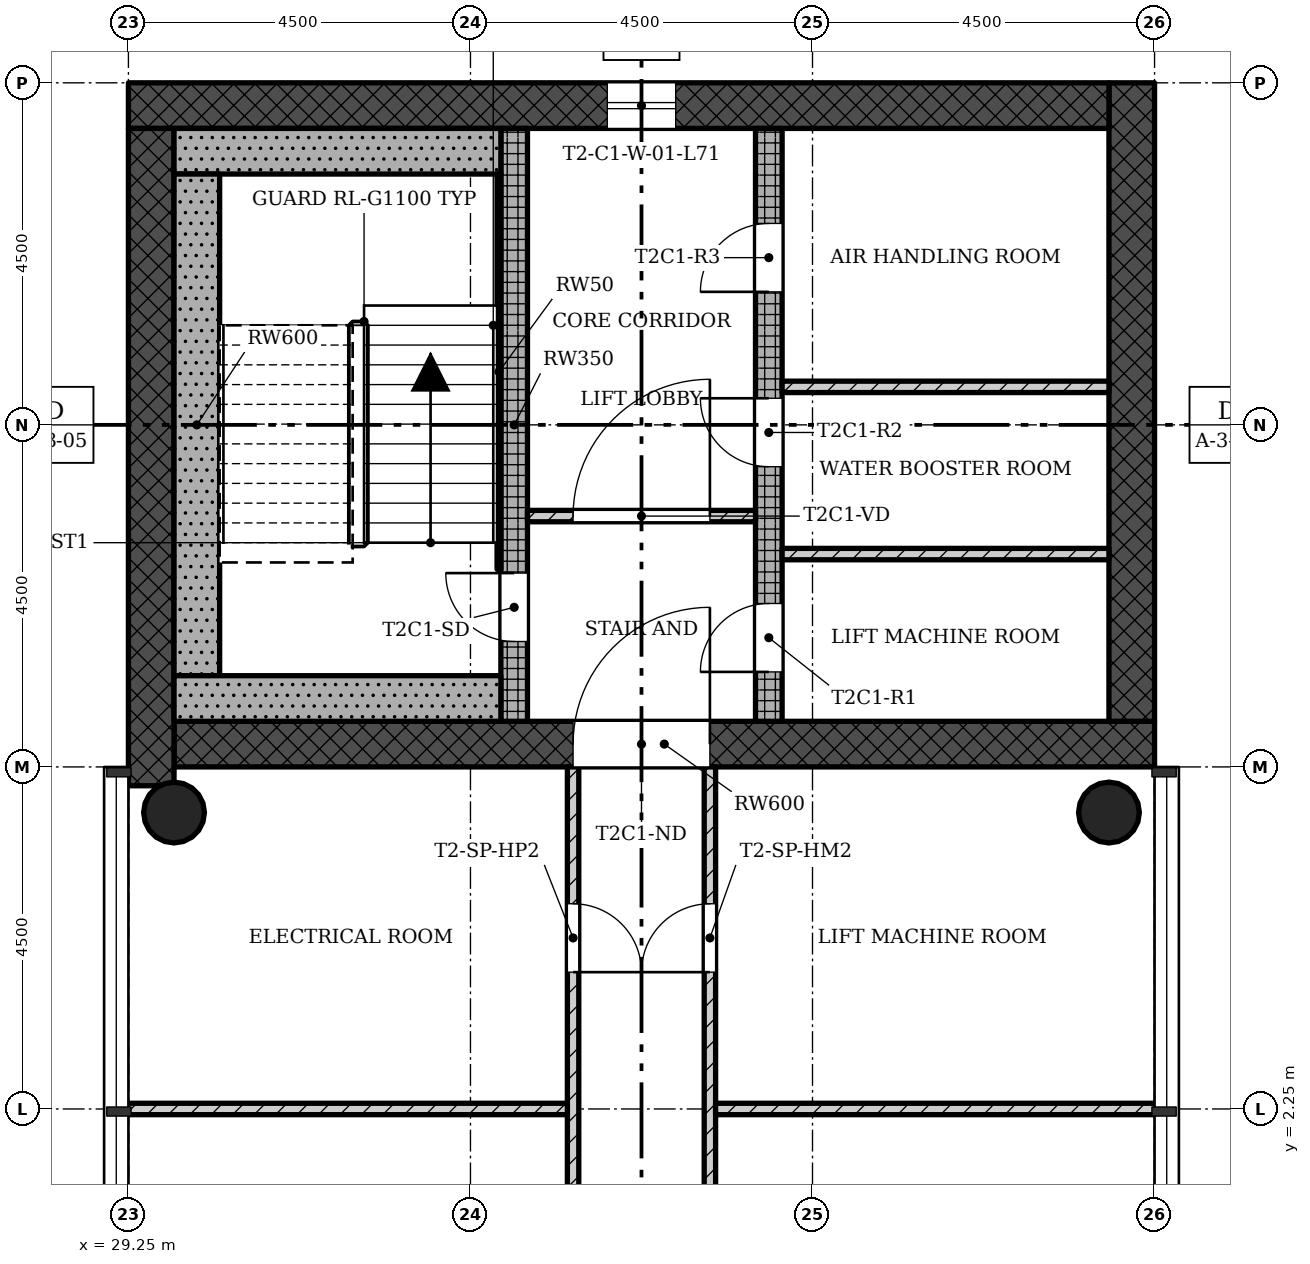
"""IFC4 building model, lengths in metres.
Left out: names, types, materials, properties, quantities, classifications, styles, units other than length and angle.
Written with IfcOpenShell. Run it as: python <this file> out.ifc"""

import sys

from ifc_helpers import new_model, si_unit, direction, frame, frame_2d, origin, origin_2d, place, context, subcontext, project, spatial, rectangle, hollow_circle, extrude, element, fill, save


model = new_model("IFC4")
c1 = context("Model", 3, precision=1e-05, world=origin(), true_north=direction((0.0, 1.0)))
c2 = subcontext(c1, "Body", "Model", "MODEL_VIEW")
j1 = project(units=[si_unit("LENGTHUNIT", "METRE"), si_unit("PLANEANGLEUNIT", "RADIAN")], contexts=[c1])
p1 = place(None, origin())
s1 = spatial("IfcSite", under=j1, at=p1, CompositionType="ELEMENT")
p2 = place(p1, origin())
s2 = spatial("IfcBuilding", under=s1, at=p2, CompositionType="ELEMENT")
p3 = place(p2, frame((0.0, 0.0, 260.4)))
s3 = spatial("IfcBuildingStorey", under=s2, at=p3, CompositionType="ELEMENT", Elevation=260.4)
p4 = place(p3, frame((29.85, 7.05, 0.0), z_axis=(0.0, 0.0, 1.0), x_axis=(1.0, 0.0, 0.0)))
e1 = element("IfcWall", 1, at=p4, inside=s3, PredefinedType="SHEAR", context=c2, shape_type="SweptSolid", body=[
    extrude(rectangle(XDim=12.9, YDim=0.6, at=frame_2d((6.45, 0.0))), origin(), (0.0, 0.0, 1.0), 4.5),
])
p5 = place(p4, frame((5.25, 0.0, 0.0)))
e2 = element("IfcOpeningElement", 2, at=p5, cuts=e1, PredefinedType="OPENING", context=c2, shape_type="SweptSolid", body=[
    extrude(rectangle(XDim=1.8, YDim=2.1, at=frame_2d((0.9, 1.05))), frame((0.0, 0.31, 0.0), z_axis=(0.0, -1.0, 0.0), x_axis=(1.0, 0.0, 0.0)), (0.0, 0.0, 1.0), 0.62),
])
p6 = place(p3, frame((42.45, 7.35, 0.0), z_axis=(0.0, 0.0, 1.0), x_axis=(0.0, 1.0, 0.0)))
e3 = element("IfcWall", 3, at=p6, inside=s3, PredefinedType="SHEAR", context=c2, shape_type="SweptSolid", body=[
    extrude(rectangle(XDim=8.4, YDim=0.6, at=frame_2d((4.2, 0.0))), origin(), (0.0, 0.0, 1.0), 4.5),
])
p7 = place(p3, frame((42.15, 15.45, 0.0), z_axis=(0.0, 0.0, 1.0), x_axis=(-1.0, 0.0, 0.0)))
e4 = element("IfcWall", 4, at=p7, inside=s3, PredefinedType="SHEAR", context=c2, shape_type="SweptSolid", body=[
    extrude(rectangle(XDim=12.9, YDim=0.6, at=frame_2d((6.45, 0.0))), origin(), (0.0, 0.0, 1.0), 4.5),
])
p8 = place(p7, frame((5.7, 0.0, 0.45)))
e5 = element("IfcOpeningElement", 5, at=p8, cuts=e4, PredefinedType="OPENING", context=c2, shape_type="SweptSolid", body=[
    extrude(rectangle(XDim=0.9, YDim=2.4, at=frame_2d((0.45, 1.2))), frame((0.0, 0.31, 0.0), z_axis=(0.0, -1.0, 0.0), x_axis=(1.0, 0.0, 0.0)), (0.0, 0.0, 1.0), 0.62),
])
p9 = place(p3, frame((29.55, 15.15, 0.0), z_axis=(0.0, 0.0, 1.0), x_axis=(0.0, -1.0, 0.0)))
e6 = element("IfcWall", 6, at=p9, inside=s3, PredefinedType="SHEAR", context=c2, shape_type="SweptSolid", body=[
    extrude(rectangle(XDim=8.648, YDim=0.6, at=frame_2d((4.324, 0.0))), origin(), (0.0, 0.0, 1.0), 4.5),
])
p10 = place(p3, frame((34.325, 7.35, 0.0), z_axis=(0.0, 0.0, 1.0), x_axis=(0.0, 1.0, 0.0)))
e7 = element("IfcWall", 7, at=p10, inside=s3, PredefinedType="SHEAR", context=c2, shape_type="SweptSolid", body=[
    extrude(rectangle(XDim=7.8, YDim=0.35, at=frame_2d((3.9, 0.0))), origin(), (0.0, 0.0, 1.0), 4.5),
])
p11 = place(p10, frame((1.05, 0.0, 0.0)))
e8 = element("IfcOpeningElement", 8, at=p11, cuts=e7, PredefinedType="OPENING", context=c2, shape_type="SweptSolid", body=[
    extrude(rectangle(XDim=0.9, YDim=2.1, at=frame_2d((0.45, 1.05))), frame((0.0, 0.185, 0.0), z_axis=(0.0, -1.0, 0.0), x_axis=(1.0, 0.0, 0.0)), (0.0, 0.0, 1.0), 0.37),
])
p12 = place(p3, frame((37.675, 7.35, 0.0), z_axis=(0.0, 0.0, 1.0), x_axis=(0.0, 1.0, 0.0)))
e9 = element("IfcWall", 9, at=p12, inside=s3, PredefinedType="SHEAR", context=c2, shape_type="SweptSolid", body=[
    extrude(rectangle(XDim=7.8, YDim=0.35, at=frame_2d((3.9, 0.0))), origin(), (0.0, 0.0, 1.0), 4.5),
])
p13 = place(p12, frame((0.65, 0.0, 0.0)))
e10 = element("IfcOpeningElement", 10, at=p13, cuts=e9, PredefinedType="OPENING", context=c2, shape_type="SweptSolid", body=[
    extrude(rectangle(XDim=0.9, YDim=2.1, at=frame_2d((0.45, 1.05))), frame((0.0, 0.185, 0.0), z_axis=(0.0, -1.0, 0.0), x_axis=(1.0, 0.0, 0.0)), (0.0, 0.0, 1.0), 0.37),
])
p14 = place(p12, frame((3.35, 0.0, 0.0)))
e11 = element("IfcOpeningElement", 11, at=p14, cuts=e9, PredefinedType="OPENING", context=c2, shape_type="SweptSolid", body=[
    extrude(rectangle(XDim=0.9, YDim=2.1, at=frame_2d((0.45, 1.05))), frame((0.0, 0.185, 0.0), z_axis=(0.0, -1.0, 0.0), x_axis=(1.0, 0.0, 0.0)), (0.0, 0.0, 1.0), 0.37),
])
p15 = place(p12, frame((5.65, 0.0, 0.0)))
e12 = element("IfcOpeningElement", 12, at=p15, cuts=e9, PredefinedType="OPENING", context=c2, shape_type="SweptSolid", body=[
    extrude(rectangle(XDim=0.9, YDim=2.1, at=frame_2d((0.45, 1.05))), frame((0.0, 0.185, 0.0), z_axis=(0.0, -1.0, 0.0), x_axis=(1.0, 0.0, 0.0)), (0.0, 0.0, 1.0), 0.37),
])
for number, where, z_axis, x_axis in (
    (13, (42.15, 6.15, 0.0), (0.0, 0.0, 1.0), (1.0, 0.0, 0.0)),
    (14, (29.85, 6.15, 0.0), (0.0, 0.0, 1.0), (1.0, 0.0, 0.0)),
):
    element("IfcColumn", number, at=place(p3, frame(where, z_axis=z_axis, x_axis=x_axis)), inside=s3, PredefinedType="COLUMN", context=c2, shape_type="SweptSolid", body=[
        extrude(hollow_circle(Radius=0.4, WallThickness=0.028, at=origin_2d()), origin(), (0.0, 0.0, 1.0), 4.5),
    ])
p16 = place(p3, frame((37.5, 10.05, 0.0), z_axis=(0.0, 0.0, 1.0), x_axis=(-1.0, 0.0, 0.0)))
e15 = element("IfcWall", 15, at=p16, inside=s3, PredefinedType="PARTITIONING", context=c2, shape_type="SweptSolid", body=[
    extrude(rectangle(XDim=3.0, YDim=0.15, at=frame_2d((1.5, 0.0))), origin(), (0.0, 0.0, 1.0), 4.09),
])
p17 = place(p16, frame((0.6, 0.0, 0.0)))
e16 = element("IfcOpeningElement", 16, at=p17, cuts=e15, PredefinedType="OPENING", context=c2, shape_type="SweptSolid", body=[
    extrude(rectangle(XDim=1.8, YDim=2.1, at=frame_2d((0.9, 1.05))), frame((0.0, 0.085, 0.0), z_axis=(0.0, -1.0, 0.0), x_axis=(1.0, 0.0, 0.0)), (0.0, 0.0, 1.0), 0.17),
])
for number, where, z_axis, x_axis in (
    (17, (42.15, 9.55, 0.0), (0.0, 0.0, 1.0), (-1.0, 0.0, 0.0)),
    (18, (42.15, 11.75, 0.0), (0.0, 0.0, 1.0), (-1.0, 0.0, 0.0)),
):
    element("IfcWall", number, at=place(p3, frame(where, z_axis=z_axis, x_axis=x_axis)), inside=s3, PredefinedType="PARTITIONING", context=c2, shape_type="SweptSolid", body=[
        extrude(rectangle(XDim=4.3, YDim=0.15, at=frame_2d((2.15, 0.0))), origin(), (0.0, 0.0, 1.0), 4.09),
    ])
p18 = place(p3, frame((35.1, -6.75, 0.0), z_axis=(0.0, 0.0, 1.0), x_axis=(0.0, 1.0, 0.0)))
e19 = element("IfcWall", 19, at=p18, inside=s3, PredefinedType="PARTITIONING", context=c2, shape_type="SweptSolid", body=[
    extrude(rectangle(XDim=13.5, YDim=0.15, at=frame_2d((6.75, 0.0))), origin(), (0.0, 0.0, 1.0), 4.09),
])
p19 = place(p18, frame((4.05, 0.0, 0.0)))
e20 = element("IfcOpeningElement", 20, at=p19, cuts=e19, PredefinedType="OPENING", context=c2, shape_type="SweptSolid", body=[
    extrude(rectangle(XDim=0.9, YDim=2.1, at=frame_2d((0.45, 1.05))), frame((0.0, 0.085, 0.0), z_axis=(0.0, -1.0, 0.0), x_axis=(1.0, 0.0, 0.0)), (0.0, 0.0, 1.0), 0.17),
])
p20 = place(p18, frame((10.8, 0.0, 0.0)))
e21 = element("IfcOpeningElement", 21, at=p20, cuts=e19, PredefinedType="OPENING", context=c2, shape_type="SweptSolid", body=[
    extrude(rectangle(XDim=0.9, YDim=2.1, at=frame_2d((0.45, 1.05))), frame((0.0, 0.085, 0.0), z_axis=(0.0, -1.0, 0.0), x_axis=(1.0, 0.0, 0.0)), (0.0, 0.0, 1.0), 0.17),
])
p21 = place(p3, frame((35.025, 2.25, 0.0), z_axis=(0.0, 0.0, 1.0), x_axis=(-1.0, 0.0, 0.0)))
e22 = element("IfcWall", 22, at=p21, inside=s3, PredefinedType="PARTITIONING", context=c2, shape_type="SweptSolid", body=[
    extrude(rectangle(XDim=5.875, YDim=0.15, at=frame_2d((2.938, 0.0))), origin(), (0.0, 0.0, 1.0), 4.09),
])
p22 = place(p3, frame((36.9, -6.75, 0.0), z_axis=(0.0, 0.0, 1.0), x_axis=(0.0, 1.0, 0.0)))
e23 = element("IfcWall", 23, at=p22, inside=s3, PredefinedType="PARTITIONING", context=c2, shape_type="SweptSolid", body=[
    extrude(rectangle(XDim=13.5, YDim=0.15, at=frame_2d((6.75, 0.0))), origin(), (0.0, 0.0, 1.0), 4.09),
])
p23 = place(p22, frame((4.05, 0.0, 0.0)))
e24 = element("IfcOpeningElement", 24, at=p23, cuts=e23, PredefinedType="OPENING", context=c2, shape_type="SweptSolid", body=[
    extrude(rectangle(XDim=0.9, YDim=2.1, at=frame_2d((0.45, 1.05))), frame((0.0, 0.085, 0.0), z_axis=(0.0, -1.0, 0.0), x_axis=(1.0, 0.0, 0.0)), (0.0, 0.0, 1.0), 0.17),
])
p24 = place(p22, frame((10.8, 0.0, 0.0)))
e25 = element("IfcOpeningElement", 25, at=p24, cuts=e23, PredefinedType="OPENING", context=c2, shape_type="SweptSolid", body=[
    extrude(rectangle(XDim=0.9, YDim=2.1, at=frame_2d((0.45, 1.05))), frame((0.0, 0.085, 0.0), z_axis=(0.0, -1.0, 0.0), x_axis=(1.0, 0.0, 0.0)), (0.0, 0.0, 1.0), 0.17),
])
p25 = place(p3, frame((36.975, 2.25, 0.0), z_axis=(0.0, 0.0, 1.0), x_axis=(1.0, 0.0, 0.0)))
e26 = element("IfcWall", 26, at=p25, inside=s3, PredefinedType="PARTITIONING", context=c2, shape_type="SweptSolid", body=[
    extrude(rectangle(XDim=5.875, YDim=0.15, at=frame_2d((2.938, 0.0))), origin(), (0.0, 0.0, 1.0), 4.09),
])
p26 = place(p3, frame((34.15, 14.85, 0.0), z_axis=(0.0, 0.0, 1.0), x_axis=(-1.0, 0.0, 0.0)))
e27 = element("IfcWall", 27, at=p26, inside=s3, PredefinedType="SHEAR", context=c2, shape_type="SweptSolid", body=[
    extrude(rectangle(XDim=4.3, YDim=0.6, at=frame_2d((2.15, 0.0))), origin(), (0.0, 0.0, 1.0), 4.5),
])
p27 = place(p3, frame((30.15, 7.95, 0.0), z_axis=(0.0, 0.0, 1.0), x_axis=(0.0, 1.0, 0.0)))
e28 = element("IfcWall", 28, at=p27, inside=s3, PredefinedType="SHEAR", context=c2, shape_type="SweptSolid", body=[
    extrude(rectangle(XDim=6.6, YDim=0.6, at=frame_2d((3.3, 0.0))), origin(), (0.0, 0.0, 1.0), 4.5),
])
p28 = place(p3, frame((34.15, 7.65, 0.0), z_axis=(0.0, 0.0, 1.0), x_axis=(-1.0, 0.0, 0.0)))
e29 = element("IfcWall", 29, at=p28, inside=s3, PredefinedType="SHEAR", context=c2, shape_type="SweptSolid", body=[
    extrude(rectangle(XDim=4.3, YDim=0.6, at=frame_2d((2.15, 0.0))), origin(), (0.0, 0.0, 1.0), 4.5),
])
p29 = place(p3, frame((34.125, 9.35, 0.0), z_axis=(0.0, 0.0, 1.0), x_axis=(0.0, 1.0, 0.0)))
e30 = element("IfcWall", 30, at=p29, inside=s3, PredefinedType="SHEAR", context=c2, shape_type="SweptSolid", body=[
    extrude(rectangle(XDim=5.2, YDim=0.05, at=frame_2d((2.6, 0.0))), origin(), (0.0, 0.0, 1.0), 4.5),
])
p30 = place(p8, origin())
e31 = element("IfcWindow", 31, at=p30, inside=s3, PartitioningType="SINGLE_PANEL", PredefinedType="WINDOW", context=c2, shape_type="SweptSolid", body=[
    extrude(rectangle(XDim=0.9, YDim=2.4, at=frame_2d((0.45, 1.2))), frame((0.0, 0.03, 0.0), z_axis=(0.0, -1.0, 0.0), x_axis=(1.0, 0.0, 0.0)), (0.0, 0.0, 1.0), 0.06),
])
fill(e5, e31)
p31 = place(p17, origin())
e32 = element("IfcDoor", 32, at=p31, inside=s3, OperationType="SINGLE_SWING_LEFT", PredefinedType="DOOR", context=c2, shape_type="SweptSolid", body=[
    extrude(rectangle(XDim=1.8, YDim=2.1, at=frame_2d((0.9, 1.05))), frame((0.0, 0.025, 0.0), z_axis=(0.0, -1.0, 0.0), x_axis=(1.0, 0.0, 0.0)), (0.0, 0.0, 1.0), 0.05),
])
fill(e16, e32)
p32 = place(p20, origin())
e33 = element("IfcDoor", 33, at=p32, inside=s3, OperationType="SINGLE_SWING_LEFT", PredefinedType="DOOR", context=c2, shape_type="SweptSolid", body=[
    extrude(rectangle(XDim=0.9, YDim=2.1, at=frame_2d((0.45, 1.05))), frame((0.0, 0.025, 0.0), z_axis=(0.0, -1.0, 0.0), x_axis=(1.0, 0.0, 0.0)), (0.0, 0.0, 1.0), 0.05),
])
fill(e21, e33)
p33 = place(p24, origin())
e34 = element("IfcDoor", 34, at=p33, inside=s3, OperationType="SINGLE_SWING_RIGHT", PredefinedType="DOOR", context=c2, shape_type="SweptSolid", body=[
    extrude(rectangle(XDim=0.9, YDim=2.1, at=frame_2d((0.45, 1.05))), frame((0.0, 0.025, 0.0), z_axis=(0.0, -1.0, 0.0), x_axis=(1.0, 0.0, 0.0)), (0.0, 0.0, 1.0), 0.05),
])
fill(e25, e34)
p34 = place(p11, origin())
e35 = element("IfcDoor", 35, at=p34, inside=s3, OperationType="SINGLE_SWING_LEFT", PredefinedType="DOOR", context=c2, shape_type="SweptSolid", body=[
    extrude(rectangle(XDim=0.9, YDim=2.1, at=frame_2d((0.45, 1.05))), frame((0.0, 0.025, 0.0), z_axis=(0.0, -1.0, 0.0), x_axis=(1.0, 0.0, 0.0)), (0.0, 0.0, 1.0), 0.05),
])
fill(e8, e35)
p35 = place(p13, origin())
e36 = element("IfcDoor", 36, at=p35, inside=s3, OperationType="SINGLE_SWING_RIGHT", PredefinedType="DOOR", context=c2, shape_type="SweptSolid", body=[
    extrude(rectangle(XDim=0.9, YDim=2.1, at=frame_2d((0.45, 1.05))), frame((0.0, 0.025, 0.0), z_axis=(0.0, -1.0, 0.0), x_axis=(1.0, 0.0, 0.0)), (0.0, 0.0, 1.0), 0.05),
])
fill(e10, e36)
p36 = place(p14, origin())
e37 = element("IfcDoor", 37, at=p36, inside=s3, OperationType="SINGLE_SWING_LEFT", PredefinedType="DOOR", context=c2, shape_type="SweptSolid", body=[
    extrude(rectangle(XDim=0.9, YDim=2.1, at=frame_2d((0.45, 1.05))), frame((0.0, 0.025, 0.0), z_axis=(0.0, -1.0, 0.0), x_axis=(1.0, 0.0, 0.0)), (0.0, 0.0, 1.0), 0.05),
])
fill(e11, e37)
p37 = place(p15, origin())
e38 = element("IfcDoor", 38, at=p37, inside=s3, OperationType="SINGLE_SWING_RIGHT", PredefinedType="DOOR", context=c2, shape_type="SweptSolid", body=[
    extrude(rectangle(XDim=0.9, YDim=2.1, at=frame_2d((0.45, 1.05))), frame((0.0, 0.025, 0.0), z_axis=(0.0, -1.0, 0.0), x_axis=(1.0, 0.0, 0.0)), (0.0, 0.0, 1.0), 0.05),
])
fill(e12, e38)
p38 = place(p5, origin())
e39 = element("IfcDoor", 39, at=p38, inside=s3, OperationType="SINGLE_SWING_LEFT", PredefinedType="DOOR", context=c2, shape_type="SweptSolid", body=[
    extrude(rectangle(XDim=1.8, YDim=2.1, at=frame_2d((0.9, 1.05))), frame((0.0, 0.025, 0.0), z_axis=(0.0, -1.0, 0.0), x_axis=(1.0, 0.0, 0.0)), (0.0, 0.0, 1.0), 0.05),
])
fill(e2, e39)
save(model, sys.argv[1])
